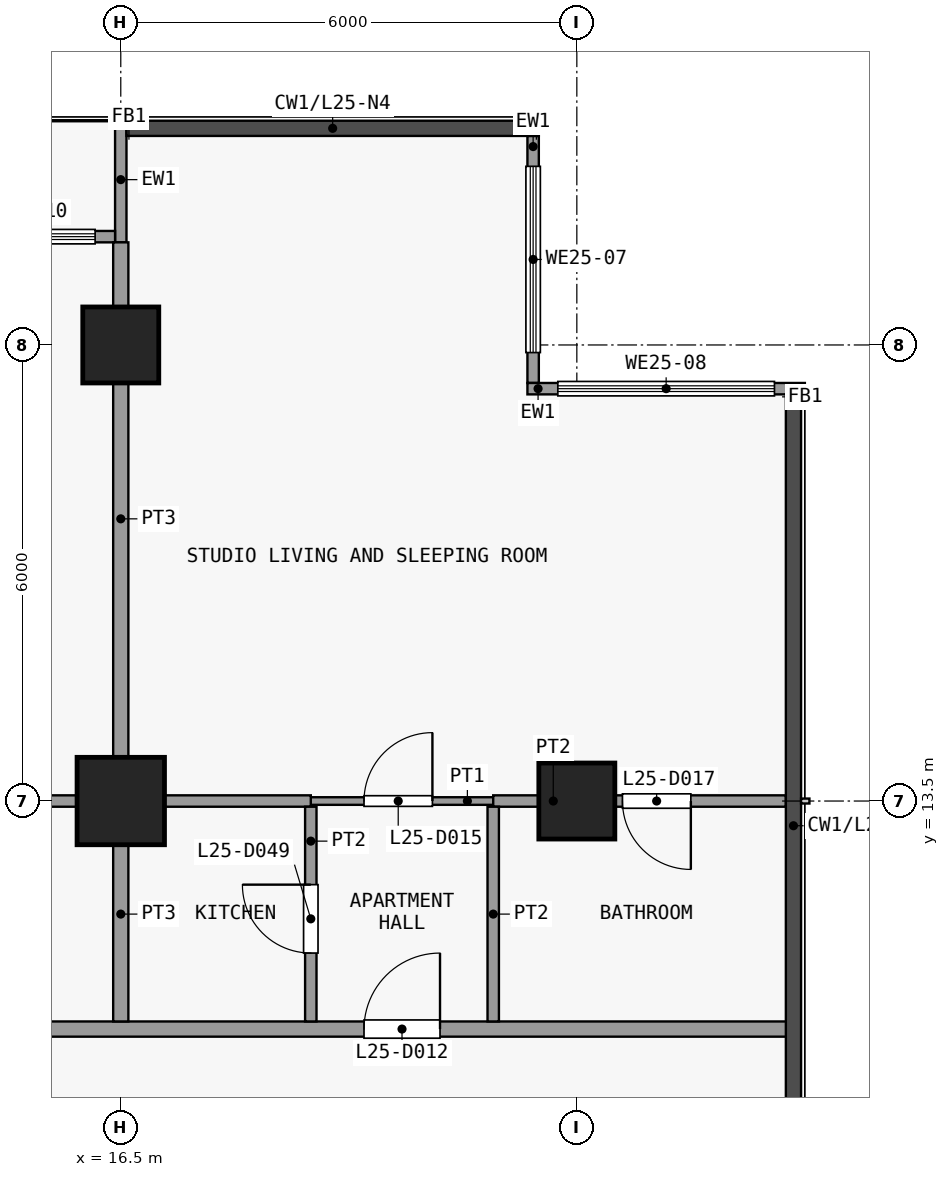
"""IFC4 building model, lengths in metres.
Left out: names, types, materials, properties, quantities, classifications, styles, units other than length and angle.
Written with IfcOpenShell. Run it as: python <this file> out.ifc"""

import sys

from ifc_helpers import new_model, si_unit, direction, frame, frame_2d, origin, origin_2d, place, context, subcontext, project, spatial, rectangle, extrude, element, fill, save


model = new_model("IFC4")
c1 = context("Model", 3, precision=1e-05, world=origin(), true_north=direction((0.0, 1.0)))
c2 = subcontext(c1, "Body", "Model", "MODEL_VIEW")
j1 = project(units=[si_unit("LENGTHUNIT", "METRE"), si_unit("PLANEANGLEUNIT", "RADIAN")], contexts=[c1])
p1 = place(None, origin())
s1 = spatial("IfcSite", under=j1, at=p1, CompositionType="ELEMENT")
p2 = place(p1, origin())
s2 = spatial("IfcBuilding", under=s1, at=p2, CompositionType="ELEMENT")
p3 = place(p2, frame((0.0, 0.0, 102.7)))
s3 = spatial("IfcBuildingStorey", under=s2, at=p3, CompositionType="ELEMENT", Elevation=102.7)
p4 = place(p3, frame((16.5, 13.5, 0.0), z_axis=(0.0, 0.0, 1.0), x_axis=(1.0, 0.0, 0.0)))
e1 = element("IfcColumn", 1, at=p4, inside=s3, PredefinedType="COLUMN", context=c2, shape_type="SweptSolid", body=[
    extrude(rectangle(XDim=1.15, YDim=1.15, at=origin_2d()), origin(), (0.0, 0.0, 1.0), 3.6),
])
for number, where, z_axis, x_axis in (
    (2, (16.5, 19.5, 0.0), (0.0, 0.0, 1.0), (1.0, 0.0, 0.0)),
    (3, (22.5, 13.5, 0.0), (0.0, 0.0, 1.0), (1.0, 0.0, 0.0)),
):
    element("IfcColumn", number, at=place(p3, frame(where, z_axis=z_axis, x_axis=x_axis)), inside=s3, PredefinedType="COLUMN", context=c2, shape_type="SweptSolid", body=[
        extrude(rectangle(XDim=1.0, YDim=1.0, at=origin_2d()), origin(), (0.0, 0.0, 1.0), 3.6),
    ])
p5 = place(p3, frame((21.925, 22.25, 0.0), z_axis=(0.0, 0.0, 1.0), x_axis=(0.0, -1.0, 0.0)))
e4 = element("IfcWall", 4, at=p5, inside=s3, PredefinedType="SOLIDWALL", context=c2, shape_type="SweptSolid", body=[
    extrude(rectangle(XDim=3.25, YDim=0.15, at=frame_2d((1.625, 0.0))), origin(), (0.0, 0.0, 1.0), 3.3),
])
p6 = place(p5, frame((0.4, 0.0, 0.9)))
e5 = element("IfcOpeningElement", 5, at=p6, cuts=e4, PredefinedType="OPENING", context=c2, shape_type="SweptSolid", body=[
    extrude(rectangle(XDim=2.45, YDim=2.4, at=frame_2d((1.225, 1.2))), frame((0.0, 0.085, 0.0), z_axis=(0.0, -1.0, 0.0), x_axis=(1.0, 0.0, 0.0)), (0.0, 0.0, 1.0), 0.17),
])
p7 = place(p3, frame((21.85, 18.925, 0.0), z_axis=(0.0, 0.0, 1.0), x_axis=(1.0, 0.0, 0.0)))
e6 = element("IfcWall", 6, at=p7, inside=s3, PredefinedType="SOLIDWALL", context=c2, shape_type="SweptSolid", body=[
    extrude(rectangle(XDim=3.65, YDim=0.15, at=frame_2d((1.825, 0.0))), origin(), (0.0, 0.0, 1.0), 3.3),
])
p8 = place(p7, frame((0.4, 0.0, 0.9)))
e7 = element("IfcOpeningElement", 7, at=p8, cuts=e6, PredefinedType="OPENING", context=c2, shape_type="SweptSolid", body=[
    extrude(rectangle(XDim=2.85, YDim=2.4, at=frame_2d((1.425, 1.2))), frame((0.0, 0.085, 0.0), z_axis=(0.0, -1.0, 0.0), x_axis=(1.0, 0.0, 0.0)), (0.0, 0.0, 1.0), 0.17),
])
p9 = place(p3, frame((16.5, 20.85, 0.0), z_axis=(0.0, 0.0, 1.0), x_axis=(0.0, 1.0, 0.0)))
e8 = element("IfcWall", 8, at=p9, inside=s3, PredefinedType="SOLIDWALL", context=c2, shape_type="SweptSolid", body=[
    extrude(rectangle(XDim=1.65, YDim=0.15, at=frame_2d((0.825, 0.0))), origin(), (0.0, 0.0, 1.0), 3.3),
])
p10 = place(p3, frame((10.575, 20.925, 0.0), z_axis=(0.0, 0.0, 1.0), x_axis=(1.0, 0.0, 0.0)))
e9 = element("IfcWall", 9, at=p10, inside=s3, PredefinedType="SOLIDWALL", context=c2, shape_type="SweptSolid", body=[
    extrude(rectangle(XDim=5.85, YDim=0.15, at=frame_2d((2.925, 0.0))), origin(), (0.0, 0.0, 1.0), 3.3),
])
p11 = place(p10, frame((2.325, 0.0, 0.0)))
e10 = element("IfcOpeningElement", 10, at=p11, cuts=e9, PredefinedType="OPENING", context=c2, shape_type="SweptSolid", body=[
    extrude(rectangle(XDim=1.2, YDim=2.4, at=frame_2d((0.6, 1.2))), frame((0.0, 0.085, 0.0), z_axis=(0.0, -1.0, 0.0), x_axis=(1.0, 0.0, 0.0)), (0.0, 0.0, 1.0), 0.17),
])
p12 = place(p10, frame((0.262, 0.0, 0.9)))
e11 = element("IfcOpeningElement", 11, at=p12, cuts=e9, PredefinedType="OPENING", context=c2, shape_type="SweptSolid", body=[
    extrude(rectangle(XDim=1.8, YDim=2.1, at=frame_2d((0.9, 1.05))), frame((0.0, 0.085, 0.0), z_axis=(0.0, -1.0, 0.0), x_axis=(1.0, 0.0, 0.0)), (0.0, 0.0, 1.0), 0.17),
])
p13 = place(p10, frame((3.788, 0.0, 0.9)))
e12 = element("IfcOpeningElement", 12, at=p13, cuts=e9, PredefinedType="OPENING", context=c2, shape_type="SweptSolid", body=[
    extrude(rectangle(XDim=1.8, YDim=2.1, at=frame_2d((0.9, 1.05))), frame((0.0, 0.085, 0.0), z_axis=(0.0, -1.0, 0.0), x_axis=(1.0, 0.0, 0.0)), (0.0, 0.0, 1.0), 0.17),
])
p14 = place(p3, frame((-25.35, 10.5, 0.0), z_axis=(0.0, 0.0, 1.0), x_axis=(1.0, 0.0, 0.0)))
e13 = element("IfcWall", 13, at=p14, inside=s3, PredefinedType="PARTITIONING", context=c2, shape_type="SweptSolid", body=[
    extrude(rectangle(XDim=50.7, YDim=0.2, at=frame_2d((25.35, 0.0))), origin(), (0.0, 0.0, 1.0), 3.3),
])
p15 = place(p14, frame((7.05, 0.0, 0.0)))
e14 = element("IfcOpeningElement", 14, at=p15, cuts=e13, PredefinedType="OPENING", context=c2, shape_type="SweptSolid", body=[
    extrude(rectangle(XDim=1.0, YDim=2.1, at=frame_2d((0.5, 1.05))), frame((0.0, 0.11, 0.0), z_axis=(0.0, -1.0, 0.0), x_axis=(1.0, 0.0, 0.0)), (0.0, 0.0, 1.0), 0.22),
])
p16 = place(p14, frame((21.55, 0.0, 0.0)))
e15 = element("IfcOpeningElement", 15, at=p16, cuts=e13, PredefinedType="OPENING", context=c2, shape_type="SweptSolid", body=[
    extrude(rectangle(XDim=1.0, YDim=2.1, at=frame_2d((0.5, 1.05))), frame((0.0, 0.11, 0.0), z_axis=(0.0, -1.0, 0.0), x_axis=(1.0, 0.0, 0.0)), (0.0, 0.0, 1.0), 0.22),
])
p17 = place(p14, frame((45.05, 0.0, 0.0)))
e16 = element("IfcOpeningElement", 16, at=p17, cuts=e13, PredefinedType="OPENING", context=c2, shape_type="SweptSolid", body=[
    extrude(rectangle(XDim=1.0, YDim=2.1, at=frame_2d((0.5, 1.05))), frame((0.0, 0.11, 0.0), z_axis=(0.0, -1.0, 0.0), x_axis=(1.0, 0.0, 0.0)), (0.0, 0.0, 1.0), 0.22),
])
p18 = place(p3, frame((19.0, 13.5, 0.0), z_axis=(0.0, 0.0, 1.0), x_axis=(1.0, 0.0, 0.0)))
e17 = element("IfcWall", 17, at=p18, inside=s3, PredefinedType="PARTITIONING", context=c2, shape_type="SweptSolid", body=[
    extrude(rectangle(XDim=2.4, YDim=0.1, at=frame_2d((1.2, 0.0))), origin(), (0.0, 0.0, 1.0), 3.3),
])
p19 = place(p18, frame((0.7, 0.0, 0.0)))
e18 = element("IfcOpeningElement", 18, at=p19, cuts=e17, PredefinedType="OPENING", context=c2, shape_type="SweptSolid", body=[
    extrude(rectangle(XDim=0.9, YDim=2.1, at=frame_2d((0.45, 1.05))), frame((0.0, 0.06, 0.0), z_axis=(0.0, -1.0, 0.0), x_axis=(1.0, 0.0, 0.0)), (0.0, 0.0, 1.0), 0.12),
])
p20 = place(p3, frame((-2.1, 13.5, 0.0), z_axis=(0.0, 0.0, 1.0), x_axis=(1.0, 0.0, 0.0)))
e19 = element("IfcWall", 19, at=p20, inside=s3, PredefinedType="PARTITIONING", context=c2, shape_type="SweptSolid", body=[
    extrude(rectangle(XDim=21.1, YDim=0.15, at=frame_2d((10.55, 0.0))), origin(), (0.0, 0.0, 1.0), 3.3),
])
p21 = place(p20, frame((15.1, 0.0, 0.0)))
e20 = element("IfcOpeningElement", 20, at=p21, cuts=e19, PredefinedType="OPENING", context=c2, shape_type="SweptSolid", body=[
    extrude(rectangle(XDim=0.9, YDim=2.1, at=frame_2d((0.45, 1.05))), frame((0.0, 0.085, 0.0), z_axis=(0.0, -1.0, 0.0), x_axis=(1.0, 0.0, 0.0)), (0.0, 0.0, 1.0), 0.17),
])
p22 = place(p3, frame((21.4, 13.5, 0.0), z_axis=(0.0, 0.0, 1.0), x_axis=(1.0, 0.0, 0.0)))
e21 = element("IfcWall", 21, at=p22, inside=s3, PredefinedType="PARTITIONING", context=c2, shape_type="SweptSolid", body=[
    extrude(rectangle(XDim=3.85, YDim=0.15, at=frame_2d((1.925, 0.0))), origin(), (0.0, 0.0, 1.0), 3.3),
])
p23 = place(p22, frame((1.7, 0.0, 0.0)))
e22 = element("IfcOpeningElement", 22, at=p23, cuts=e21, PredefinedType="OPENING", context=c2, shape_type="SweptSolid", body=[
    extrude(rectangle(XDim=0.9, YDim=2.1, at=frame_2d((0.45, 1.05))), frame((0.0, 0.085, 0.0), z_axis=(0.0, -1.0, 0.0), x_axis=(1.0, 0.0, 0.0)), (0.0, 0.0, 1.0), 0.17),
])
p24 = place(p3, frame((16.5, 10.6, 0.0), z_axis=(0.0, 0.0, 1.0), x_axis=(0.0, 1.0, 0.0)))
e23 = element("IfcWall", 23, at=p24, inside=s3, PredefinedType="PARTITIONING", context=c2, shape_type="SweptSolid", body=[
    extrude(rectangle(XDim=2.825, YDim=0.2, at=frame_2d((1.413, 0.0))), origin(), (0.0, 0.0, 1.0), 3.3),
])
p25 = place(p3, frame((16.5, 13.575, 0.0), z_axis=(0.0, 0.0, 1.0), x_axis=(0.0, 1.0, 0.0)))
e24 = element("IfcWall", 24, at=p25, inside=s3, PredefinedType="PARTITIONING", context=c2, shape_type="SweptSolid", body=[
    extrude(rectangle(XDim=7.275, YDim=0.2, at=frame_2d((3.638, 0.0))), origin(), (0.0, 0.0, 1.0), 3.3),
])
p26 = place(p3, frame((19.0, 10.6, 0.0), z_axis=(0.0, 0.0, 1.0), x_axis=(0.0, 1.0, 0.0)))
e25 = element("IfcWall", 25, at=p26, inside=s3, PredefinedType="PARTITIONING", context=c2, shape_type="SweptSolid", body=[
    extrude(rectangle(XDim=2.825, YDim=0.15, at=frame_2d((1.413, 0.0))), origin(), (0.0, 0.0, 1.0), 3.3),
])
p27 = place(p26, frame((0.9, 0.0, 0.0)))
e26 = element("IfcOpeningElement", 26, at=p27, cuts=e25, PredefinedType="OPENING", context=c2, shape_type="SweptSolid", body=[
    extrude(rectangle(XDim=0.9, YDim=2.1, at=frame_2d((0.45, 1.05))), frame((0.0, 0.085, 0.0), z_axis=(0.0, -1.0, 0.0), x_axis=(1.0, 0.0, 0.0)), (0.0, 0.0, 1.0), 0.17),
])
p28 = place(p3, frame((21.4, 10.6, 0.0), z_axis=(0.0, 0.0, 1.0), x_axis=(0.0, 1.0, 0.0)))
e27 = element("IfcWall", 27, at=p28, inside=s3, PredefinedType="PARTITIONING", context=c2, shape_type="SweptSolid", body=[
    extrude(rectangle(XDim=2.825, YDim=0.15, at=frame_2d((1.413, 0.0))), origin(), (0.0, 0.0, 1.0), 3.3),
])
p29 = place(p6, origin())
e28 = element("IfcWindow", 28, at=p29, inside=s3, PartitioningType="SINGLE_PANEL", PredefinedType="WINDOW", context=c2, shape_type="SweptSolid", body=[
    extrude(rectangle(XDim=2.45, YDim=2.4, at=frame_2d((1.225, 1.2))), frame((0.0, 0.03, 0.0), z_axis=(0.0, -1.0, 0.0), x_axis=(1.0, 0.0, 0.0)), (0.0, 0.0, 1.0), 0.06),
])
fill(e5, e28)
p30 = place(p8, origin())
e29 = element("IfcWindow", 29, at=p30, inside=s3, PartitioningType="SINGLE_PANEL", PredefinedType="WINDOW", context=c2, shape_type="SweptSolid", body=[
    extrude(rectangle(XDim=2.85, YDim=2.4, at=frame_2d((1.425, 1.2))), frame((0.0, 0.03, 0.0), z_axis=(0.0, -1.0, 0.0), x_axis=(1.0, 0.0, 0.0)), (0.0, 0.0, 1.0), 0.06),
])
fill(e7, e29)
p31 = place(p13, origin())
e30 = element("IfcWindow", 30, at=p31, inside=s3, PartitioningType="SINGLE_PANEL", PredefinedType="WINDOW", context=c2, shape_type="SweptSolid", body=[
    extrude(rectangle(XDim=1.8, YDim=2.1, at=frame_2d((0.9, 1.05))), frame((0.0, 0.03, 0.0), z_axis=(0.0, -1.0, 0.0), x_axis=(1.0, 0.0, 0.0)), (0.0, 0.0, 1.0), 0.06),
])
fill(e12, e30)
p32 = place(p17, origin())
e31 = element("IfcDoor", 31, at=p32, inside=s3, OperationType="SINGLE_SWING_LEFT", PredefinedType="DOOR", context=c2, shape_type="SweptSolid", body=[
    extrude(rectangle(XDim=1.0, YDim=2.1, at=frame_2d((0.5, 1.05))), frame((0.0, 0.025, 0.0), z_axis=(0.0, -1.0, 0.0), x_axis=(1.0, 0.0, 0.0)), (0.0, 0.0, 1.0), 0.05),
])
fill(e16, e31)
p33 = place(p19, origin())
e32 = element("IfcDoor", 32, at=p33, inside=s3, OperationType="SINGLE_SWING_LEFT", PredefinedType="DOOR", context=c2, shape_type="SweptSolid", body=[
    extrude(rectangle(XDim=0.9, YDim=2.1, at=frame_2d((0.45, 1.05))), frame((0.0, 0.025, 0.0), z_axis=(0.0, -1.0, 0.0), x_axis=(1.0, 0.0, 0.0)), (0.0, 0.0, 1.0), 0.05),
])
fill(e18, e32)
p34 = place(p23, origin())
e33 = element("IfcDoor", 33, at=p34, inside=s3, OperationType="SINGLE_SWING_RIGHT", PredefinedType="DOOR", context=c2, shape_type="SweptSolid", body=[
    extrude(rectangle(XDim=0.9, YDim=2.1, at=frame_2d((0.45, 1.05))), frame((0.0, 0.025, 0.0), z_axis=(0.0, -1.0, 0.0), x_axis=(1.0, 0.0, 0.0)), (0.0, 0.0, 1.0), 0.05),
])
fill(e22, e33)
p35 = place(p27, origin())
e34 = element("IfcDoor", 34, at=p35, inside=s3, OperationType="SINGLE_SWING_LEFT", PredefinedType="DOOR", context=c2, shape_type="SweptSolid", body=[
    extrude(rectangle(XDim=0.9, YDim=2.1, at=frame_2d((0.45, 1.05))), frame((0.0, 0.025, 0.0), z_axis=(0.0, -1.0, 0.0), x_axis=(1.0, 0.0, 0.0)), (0.0, 0.0, 1.0), 0.05),
])
fill(e26, e34)
save(model, sys.argv[1])
